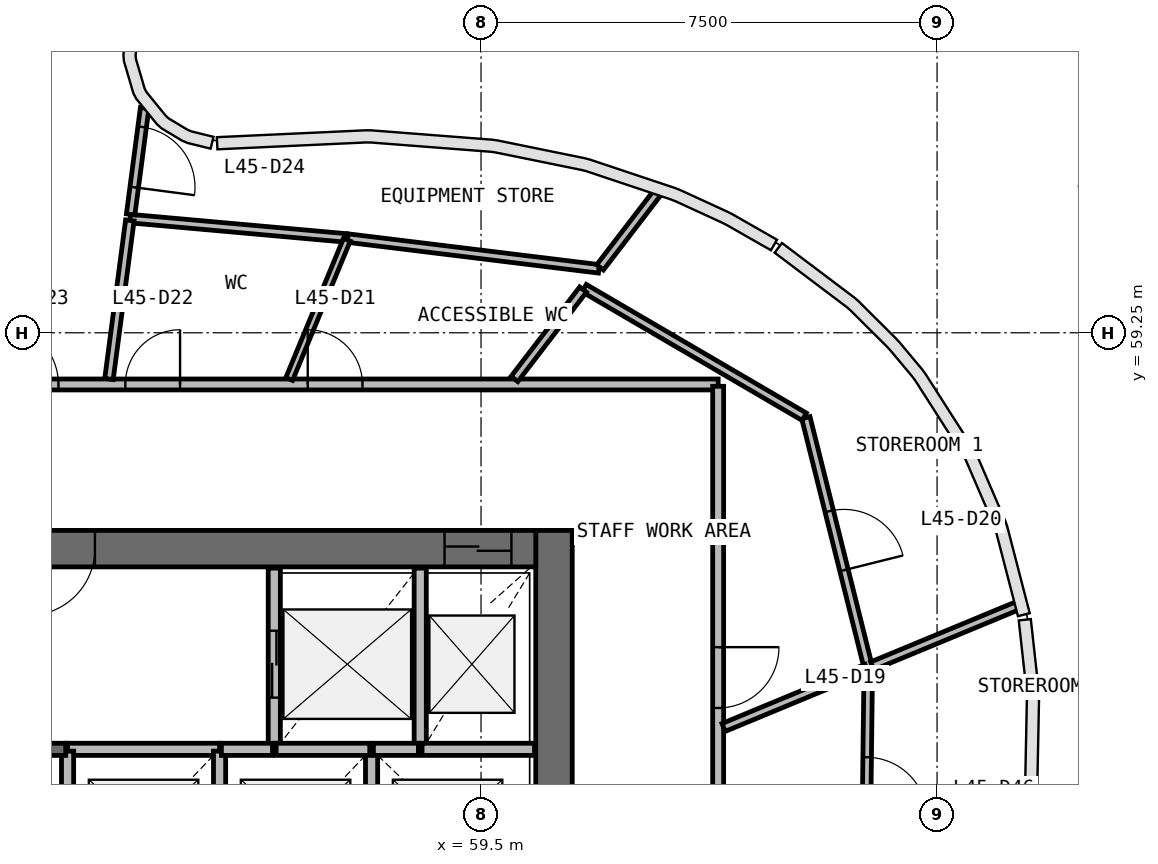
"""IFC4 building model, lengths in metres.
Left out: names, types, materials, properties, quantities, classifications, styles, units other than length and angle.
Written with IfcOpenShell. Run it as: python <this file> out.ifc"""

import sys

from ifc_helpers import new_model, si_unit, direction, frame, frame_2d, origin, place, context, subcontext, project, spatial, rectangle, extrude, source, transform, mapped, element, fill, save


model = new_model("IFC4")
c1 = context("Model", 3, precision=1e-05, world=origin(), true_north=direction((0.0, 1.0)))
c2 = subcontext(c1, "Body", "Model", "MODEL_VIEW")
j1 = project(units=[si_unit("LENGTHUNIT", "METRE"), si_unit("PLANEANGLEUNIT", "RADIAN")], contexts=[c1])
p1 = place(None, origin())
s1 = spatial("IfcSite", under=j1, at=p1, CompositionType="ELEMENT")
p2 = place(p1, origin())
s2 = spatial("IfcBuilding", under=s1, at=p2, CompositionType="ELEMENT")
p3 = place(p2, frame((0.0, 0.0, 187.7)))
s3 = spatial("IfcBuildingStorey", under=s2, at=p3, CompositionType="ELEMENT", Elevation=187.7)
p4 = place(p3, frame((60.7, 40.0, 0.0), z_axis=(0.0, 0.0, 1.0), x_axis=(0.0, 1.0, 0.0)))
e1 = element("IfcWall", 1, at=p4, inside=s3, PredefinedType="SHEAR", context=c2, shape_type="SweptSolid", body=[
    extrude(rectangle(XDim=16.0, YDim=0.6, at=frame_2d((8.0, 0.0))), origin(), (0.0, 0.0, 1.0), 3.9),
])
p5 = place(p4, frame((7.1, 0.0, 0.0)))
e2 = element("IfcOpeningElement", 2, at=p5, cuts=e1, PredefinedType="OPENING", context=c2, shape_type="SweptSolid", body=[
    extrude(rectangle(XDim=1.8, YDim=2.1, at=frame_2d((0.9, 1.05))), frame((0.0, 0.31, 0.0), z_axis=(0.0, -1.0, 0.0), x_axis=(1.0, 0.0, 0.0)), (0.0, 0.0, 1.0), 0.62),
])
p6 = place(p3, frame((60.4, 55.7, 0.0), z_axis=(0.0, 0.0, 1.0), x_axis=(-1.0, 0.0, 0.0)))
e3 = element("IfcWall", 3, at=p6, inside=s3, PredefinedType="SHEAR", context=c2, shape_type="SweptSolid", body=[
    extrude(rectangle(XDim=16.8, YDim=0.6, at=frame_2d((8.4, 0.0))), origin(), (0.0, 0.0, 1.0), 3.9),
])
p7 = place(p6, frame((0.4, 0.0, 0.0)))
e4 = element("IfcOpeningElement", 4, at=p7, cuts=e3, PredefinedType="OPENING", context=c2, shape_type="SweptSolid", body=[
    extrude(rectangle(XDim=1.1, YDim=2.1, at=frame_2d((0.55, 1.05))), frame((0.0, 0.31, 0.0), z_axis=(0.0, -1.0, 0.0), x_axis=(1.0, 0.0, 0.0)), (0.0, 0.0, 1.0), 0.62),
])
p8 = place(p6, frame((10.3, 0.0, 0.0)))
e5 = element("IfcOpeningElement", 5, at=p8, cuts=e3, PredefinedType="OPENING", context=c2, shape_type="SweptSolid", body=[
    extrude(rectangle(XDim=1.2, YDim=2.1, at=frame_2d((0.6, 1.05))), frame((0.0, 0.31, 0.0), z_axis=(0.0, -1.0, 0.0), x_axis=(1.0, 0.0, 0.0)), (0.0, 0.0, 1.0), 0.62),
])
p9 = place(p6, frame((7.25, 0.0, 0.0)))
e6 = element("IfcOpeningElement", 6, at=p9, cuts=e3, PredefinedType="OPENING", context=c2, shape_type="SweptSolid", body=[
    extrude(rectangle(XDim=1.1, YDim=2.1, at=frame_2d((0.55, 1.05))), frame((0.0, 0.31, 0.0), z_axis=(0.0, -1.0, 0.0), x_axis=(1.0, 0.0, 0.0)), (0.0, 0.0, 1.0), 0.62),
])
p10 = place(p3, frame((56.1, 55.38, 0.0), z_axis=(0.0, 0.0, 1.0), x_axis=(0.0, -1.0, 0.0)))
e7 = element("IfcWall", 7, at=p10, inside=s3, PredefinedType="SOLIDWALL", context=c2, shape_type="SweptSolid", body=[
    extrude(rectangle(XDim=2.98, YDim=0.2, at=frame_2d((1.49, 0.0))), origin(), (0.0, 0.0, 1.0), 3.58),
])
p11 = place(p10, frame((1.03, 0.0, 0.0)))
e8 = element("IfcOpeningElement", 8, at=p11, cuts=e7, PredefinedType="OPENING", context=c2, shape_type="SweptSolid", body=[
    extrude(rectangle(XDim=1.1, YDim=2.1, at=frame_2d((0.55, 1.05))), frame((0.0, 0.11, 0.0), z_axis=(0.0, -1.0, 0.0), x_axis=(1.0, 0.0, 0.0)), (0.0, 0.0, 1.0), 0.22),
])
p12 = place(p3, frame((58.5, 52.4, 0.0), z_axis=(0.0, 0.0, 1.0), x_axis=(0.0, 1.0, 0.0)))
e9 = element("IfcWall", 9, at=p12, inside=s3, PredefinedType="SOLIDWALL", context=c2, shape_type="SweptSolid", body=[
    extrude(rectangle(XDim=2.98, YDim=0.2, at=frame_2d((1.49, 0.0))), origin(), (0.0, 0.0, 1.0), 3.58),
])
p13 = place(p3, frame((55.2, 52.4, 0.0), z_axis=(0.0, 0.0, 1.0), x_axis=(-1.0, 0.0, 0.0)))
e10 = element("IfcWall", 10, at=p13, inside=s3, PredefinedType="SOLIDWALL", context=c2, shape_type="SweptSolid", body=[
    extrude(rectangle(XDim=2.5, YDim=0.2, at=frame_2d((1.25, 0.0))), origin(), (0.0, 0.0, 1.0), 3.58),
])
for number, where, z_axis, x_axis in (
    (11, (52.7, 52.37, 0.0), (0.0, 0.0, 1.0), (0.0, -1.0, 0.0)),
    (12, (55.2, 50.01, 0.0), (0.0, 0.0, 1.0), (0.0, 1.0, 0.0)),
):
    element("IfcWall", number, at=place(p3, frame(where, z_axis=z_axis, x_axis=x_axis)), inside=s3, PredefinedType="SOLIDWALL", context=c2, shape_type="SweptSolid", body=[
        extrude(rectangle(XDim=2.36, YDim=0.2, at=frame_2d((1.18, 0.0))), origin(), (0.0, 0.0, 1.0), 3.58),
    ])
p14 = place(p3, frame((57.7, 50.01, 0.0), z_axis=(0.0, 0.0, 1.0), x_axis=(0.0, 1.0, 0.0)))
e13 = element("IfcWall", 13, at=p14, inside=s3, PredefinedType="SOLIDWALL", context=c2, shape_type="SweptSolid", body=[
    extrude(rectangle(XDim=2.39, YDim=0.2, at=frame_2d((1.195, 0.0))), origin(), (0.0, 0.0, 1.0), 3.58),
])
p15 = place(p3, frame((50.43, 52.4, 0.0), z_axis=(0.0, 0.0, 1.0), x_axis=(1.0, 0.0, 0.0)))
e14 = element("IfcWall", 14, at=p15, inside=s3, PredefinedType="SOLIDWALL", context=c2, shape_type="SweptSolid", body=[
    extrude(rectangle(XDim=2.24, YDim=0.2, at=frame_2d((1.12, 0.0))), origin(), (0.0, 0.0, 1.0), 3.58),
])
p16 = place(p3, frame((60.38, 52.4, 0.0), z_axis=(0.0, 0.0, 1.0), x_axis=(-1.0, 0.0, 0.0)))
e15 = element("IfcWall", 15, at=p16, inside=s3, PredefinedType="SOLIDWALL", context=c2, shape_type="SweptSolid", body=[
    extrude(rectangle(XDim=1.85, YDim=0.2, at=frame_2d((0.925, 0.0))), origin(), (0.0, 0.0, 1.0), 3.58),
])
p17 = place(p3, frame((57.67, 52.4, 0.0), z_axis=(0.0, 0.0, 1.0), x_axis=(-1.0, 0.0, 0.0)))
e16 = element("IfcWall", 16, at=p17, inside=s3, PredefinedType="SOLIDWALL", context=c2, shape_type="SweptSolid", body=[
    extrude(rectangle(XDim=1.54, YDim=0.2, at=frame_2d((0.77, 0.0))), origin(), (0.0, 0.0, 1.0), 3.58),
])
p18 = place(p3, frame((56.07, 52.4, 0.0), z_axis=(0.0, 0.0, 1.0), x_axis=(-1.0, 0.0, 0.0)))
e17 = element("IfcWall", 17, at=p18, inside=s3, PredefinedType="SOLIDWALL", context=c2, shape_type="SweptSolid", body=[
    extrude(rectangle(XDim=0.84, YDim=0.2, at=frame_2d((0.42, 0.0))), origin(), (0.0, 0.0, 1.0), 3.58),
])
p19 = place(p3, frame((58.47, 52.4, 0.0), z_axis=(0.0, 0.0, 1.0), x_axis=(-1.0, 0.0, 0.0)))
e18 = element("IfcWall", 18, at=p19, inside=s3, PredefinedType="SOLIDWALL", context=c2, shape_type="SweptSolid", body=[
    extrude(rectangle(XDim=0.74, YDim=0.2, at=frame_2d((0.37, 0.0))), origin(), (0.0, 0.0, 1.0), 3.58),
])
p20 = place(p3, frame((40.6, 58.4, 0.0), z_axis=(0.0, 0.0, 1.0), x_axis=(1.0, 0.0, 0.0)))
e19 = element("IfcWall", 19, at=p20, inside=s3, PredefinedType="PARTITIONING", context=c2, shape_type="SweptSolid", body=[
    extrude(rectangle(XDim=22.8, YDim=0.18, at=frame_2d((11.4, 0.0))), origin(), (0.0, 0.0, 1.0), 2.88),
])
p21 = place(p20, frame((16.05, 0.0, 0.0)))
e20 = element("IfcOpeningElement", 20, at=p21, cuts=e19, PredefinedType="OPENING", context=c2, shape_type="SweptSolid", body=[
    extrude(rectangle(XDim=0.9, YDim=2.1, at=frame_2d((0.45, 1.05))), frame((0.0, 0.1, 0.0), z_axis=(0.0, -1.0, 0.0), x_axis=(1.0, 0.0, 0.0)), (0.0, 0.0, 1.0), 0.2),
])
p22 = place(p20, frame((13.05, 0.0, 0.0)))
e21 = element("IfcOpeningElement", 21, at=p22, cuts=e19, PredefinedType="OPENING", context=c2, shape_type="SweptSolid", body=[
    extrude(rectangle(XDim=0.9, YDim=2.1, at=frame_2d((0.45, 1.05))), frame((0.0, 0.1, 0.0), z_axis=(0.0, -1.0, 0.0), x_axis=(1.0, 0.0, 0.0)), (0.0, 0.0, 1.0), 0.2),
])
p23 = place(p20, frame((10.95, 0.0, 0.0)))
e22 = element("IfcOpeningElement", 22, at=p23, cuts=e19, PredefinedType="OPENING", context=c2, shape_type="SweptSolid", body=[
    extrude(rectangle(XDim=1.0, YDim=2.1, at=frame_2d((0.5, 1.05))), frame((0.0, 0.1, 0.0), z_axis=(0.0, -1.0, 0.0), x_axis=(1.0, 0.0, 0.0)), (0.0, 0.0, 1.0), 0.2),
])
p24 = place(p3, frame((63.4, 58.37, 0.0), z_axis=(0.0, 0.0, 1.0), x_axis=(0.0, -1.0, 0.0)))
e23 = element("IfcWall", 23, at=p24, inside=s3, PredefinedType="PARTITIONING", context=c2, shape_type="SweptSolid", body=[
    extrude(rectangle(XDim=20.74, YDim=0.18, at=frame_2d((10.37, 0.0))), origin(), (0.0, 0.0, 1.0), 2.88),
])
p25 = place(p24, frame((4.29, 0.0, 0.0)))
e24 = element("IfcOpeningElement", 24, at=p25, cuts=e23, PredefinedType="OPENING", context=c2, shape_type="SweptSolid", body=[
    extrude(rectangle(XDim=1.0, YDim=2.1, at=frame_2d((0.5, 1.05))), frame((0.0, 0.1, 0.0), z_axis=(0.0, -1.0, 0.0), x_axis=(1.0, 0.0, 0.0)), (0.0, 0.0, 1.0), 0.2),
])
p26 = place(p24, frame((12.09, 0.0, 0.0)))
e25 = element("IfcOpeningElement", 25, at=p26, cuts=e23, PredefinedType="OPENING", context=c2, shape_type="SweptSolid", body=[
    extrude(rectangle(XDim=1.0, YDim=2.1, at=frame_2d((0.5, 1.05))), frame((0.0, 0.1, 0.0), z_axis=(0.0, -1.0, 0.0), x_axis=(1.0, 0.0, 0.0)), (0.0, 0.0, 1.0), 0.2),
])
p27 = place(p24, frame((9.89, 0.0, 0.0)))
e26 = element("IfcOpeningElement", 26, at=p27, cuts=e23, PredefinedType="OPENING", context=c2, shape_type="SweptSolid", body=[
    extrude(rectangle(XDim=1.0, YDim=2.1, at=frame_2d((0.5, 1.05))), frame((0.0, 0.1, 0.0), z_axis=(0.0, -1.0, 0.0), x_axis=(1.0, 0.0, 0.0)), (0.0, 0.0, 1.0), 0.2),
])
p28 = place(p3, frame((64.842, 57.854, 0.0), z_axis=(0.0, 0.0, 1.0), x_axis=(0.2424271277, -0.970169618033, 0.0)))
e27 = element("IfcWall", 27, at=p28, inside=s3, PredefinedType="PARTITIONING", context=c2, shape_type="SweptSolid", body=[
    extrude(rectangle(XDim=4.236, YDim=0.14, at=frame_2d((2.118, 0.0))), origin(), (0.0, 0.0, 1.0), 2.88),
])
p29 = place(p28, frame((1.586, 0.0, 0.0)))
e28 = element("IfcOpeningElement", 28, at=p29, cuts=e27, PredefinedType="OPENING", context=c2, shape_type="SweptSolid", body=[
    extrude(rectangle(XDim=1.0, YDim=2.1, at=frame_2d((0.5, 1.05))), frame((0.0, 0.08, 0.0), z_axis=(0.0, -1.0, 0.0), x_axis=(1.0, 0.0, 0.0)), (0.0, 0.0, 1.0), 0.16),
])
p30 = place(p3, frame((64.816, 57.869, 0.0), z_axis=(0.0, 0.0, 1.0), x_axis=(-0.86339006173, 0.504537016785, 0.0)))
e29 = element("IfcWall", 29, at=p30, inside=s3, PredefinedType="PARTITIONING", context=c2, shape_type="SweptSolid", body=[
    extrude(rectangle(XDim=4.193, YDim=0.14, at=frame_2d((2.096, 0.0))), origin(), (0.0, 0.0, 1.0), 2.88),
])
p31 = place(p3, frame((61.439, 60.302, 0.0), z_axis=(0.0, 0.0, 1.0), x_axis=(-0.99258234717, 0.121574191698, 0.0)))
e30 = element("IfcWall", 30, at=p31, inside=s3, PredefinedType="PARTITIONING", context=c2, shape_type="SweptSolid", body=[
    extrude(rectangle(XDim=4.165, YDim=0.14, at=frame_2d((2.083, 0.0))), origin(), (0.0, 0.0, 1.0), 2.88),
])
p32 = place(p3, frame((65.868, 53.715, 0.0), z_axis=(0.0, 0.0, 1.0), x_axis=(-0.01234705924, -0.999923772159, 0.0)))
e31 = element("IfcWall", 31, at=p32, inside=s3, PredefinedType="PARTITIONING", context=c2, shape_type="SweptSolid", body=[
    extrude(rectangle(XDim=3.895, YDim=0.14, at=frame_2d((1.948, 0.0))), origin(), (0.0, 0.0, 1.0), 2.88),
])
p33 = place(p32, frame((1.446, 0.0, 0.0)))
e32 = element("IfcOpeningElement", 32, at=p33, cuts=e31, PredefinedType="OPENING", context=c2, shape_type="SweptSolid", body=[
    extrude(rectangle(XDim=1.0, YDim=2.1, at=frame_2d((0.5, 1.05))), frame((0.0, 0.08, 0.0), z_axis=(0.0, -1.0, 0.0), x_axis=(1.0, 0.0, 0.0)), (0.0, 0.0, 1.0), 0.16),
])
p34 = place(p3, frame((57.275, 60.811, 0.0), z_axis=(0.0, 0.0, 1.0), x_axis=(-0.996026962711, 0.08905217321, 0.0)))
e33 = element("IfcWall", 33, at=p34, inside=s3, PredefinedType="PARTITIONING", context=c2, shape_type="SweptSolid", body=[
    extrude(rectangle(XDim=3.561, YDim=0.14, at=frame_2d((1.781, 0.0))), origin(), (0.0, 0.0, 1.0), 2.88),
])
p35 = place(p3, frame((53.381, 58.49, 0.0), z_axis=(0.0, 0.0, 1.0), x_axis=(0.130497729181, 0.991448608188, 0.0)))
e34 = element("IfcWall", 34, at=p35, inside=s3, PredefinedType="PARTITIONING", context=c2, shape_type="SweptSolid", body=[
    extrude(rectangle(XDim=2.63, YDim=0.14, at=frame_2d((1.315, 0.0))), origin(), (0.0, 0.0, 1.0), 2.88),
])
p36 = place(p3, frame((65.934, 53.772, 0.0), z_axis=(0.0, 0.0, 1.0), x_axis=(0.923877293678, 0.382688837341, 0.0)))
e35 = element("IfcWall", 35, at=p36, inside=s3, PredefinedType="PARTITIONING", context=c2, shape_type="SweptSolid", body=[
    extrude(rectangle(XDim=2.602, YDim=0.14, at=frame_2d((1.301, 0.0))), origin(), (0.0, 0.0, 1.0), 2.88),
])
p37 = place(p3, frame((63.49, 52.759, 0.0), z_axis=(0.0, 0.0, 1.0), x_axis=(0.923889395606, 0.382659619881, 0.0)))
e36 = element("IfcWall", 36, at=p37, inside=s3, PredefinedType="PARTITIONING", context=c2, shape_type="SweptSolid", body=[
    extrude(rectangle(XDim=2.545, YDim=0.14, at=frame_2d((1.272, 0.0))), origin(), (0.0, 0.0, 1.0), 2.88),
])
p38 = place(p3, frame((60.049, 58.49, 0.0), z_axis=(0.0, 0.0, 1.0), x_axis=(0.60873011284, 0.79337736905, 0.0)))
e37 = element("IfcWall", 37, at=p38, inside=s3, PredefinedType="PARTITIONING", context=c2, shape_type="SweptSolid", body=[
    extrude(rectangle(XDim=1.854, YDim=0.14, at=frame_2d((0.927, 0.0))), origin(), (0.0, 0.0, 1.0), 2.88),
])
p39 = place(p3, frame((53.968, 62.946, 0.0), z_axis=(0.0, 0.0, 1.0), x_axis=(-0.130658590835, -0.991427421772, 0.0)))
e38 = element("IfcWall", 38, at=p39, inside=s3, PredefinedType="PARTITIONING", context=c2, shape_type="SweptSolid", body=[
    extrude(rectangle(XDim=1.764, YDim=0.14, at=frame_2d((0.882, 0.0))), origin(), (0.0, 0.0, 1.0), 2.88),
])
p40 = place(p39, frame((0.314, 0.0, 0.0)))
e39 = element("IfcOpeningElement", 39, at=p40, cuts=e38, PredefinedType="OPENING", context=c2, shape_type="SweptSolid", body=[
    extrude(rectangle(XDim=1.0, YDim=2.1, at=frame_2d((0.5, 1.05))), frame((0.0, 0.08, 0.0), z_axis=(0.0, -1.0, 0.0), x_axis=(1.0, 0.0, 0.0)), (0.0, 0.0, 1.0), 0.16),
])
p41 = place(p3, frame((61.458, 60.325, 0.0), z_axis=(0.0, 0.0, 1.0), x_axis=(0.608709383153, 0.793393273769, 0.0)))
e40 = element("IfcWall", 40, at=p41, inside=s3, PredefinedType="PARTITIONING", context=c2, shape_type="SweptSolid", body=[
    extrude(rectangle(XDim=1.568, YDim=0.14, at=frame_2d((0.784, 0.0))), origin(), (0.0, 0.0, 1.0), 2.88),
])
p42 = place(p3, frame((56.345, 58.49, 0.0), z_axis=(0.0, 0.0, 1.0), x_axis=(0.382656259044, 0.923890787601, 0.0)))
e41 = element("IfcWall", 41, at=p42, inside=s3, PredefinedType="PARTITIONING", context=c2, shape_type="SweptSolid", body=[
    extrude(rectangle(XDim=2.479, YDim=0.12, at=frame_2d((1.239, 0.0))), origin(), (0.0, 0.0, 1.0), 2.88),
])
m1 = source(origin(), c2, "Body", "SweptSolid", [
    extrude(rectangle(XDim=1.1, YDim=2.1, at=frame_2d((0.55, 1.05))), frame((0.0, 0.025, 0.0), z_axis=(0.0, -1.0, 0.0), x_axis=(1.0, 0.0, 0.0)), (0.0, 0.0, 1.0), 0.05),
])
p43 = place(p11, origin())
e42 = element("IfcDoor", 42, at=p43, inside=s3, OperationType="DOUBLE_DOOR_SLIDING", PredefinedType="USERDEFINED", context=c2, shape_type="MappedRepresentation", body=[
    mapped(m1, transform((0.0, 0.0, 0.0), scale=1.0)),
])
fill(e8, e42)
p44 = place(p7, origin())
e43 = element("IfcDoor", 43, at=p44, inside=s3, OperationType="DOUBLE_DOOR_SLIDING", PredefinedType="USERDEFINED", context=c2, shape_type="MappedRepresentation", body=[
    mapped(m1, transform((0.0, 0.0, 0.0), scale=1.0)),
])
fill(e4, e43)
m2 = source(origin(), c2, "Body", "SweptSolid", [
    extrude(rectangle(XDim=1.1, YDim=2.1, at=frame_2d((0.55, 1.05))), frame((0.0, 0.025, 0.0), z_axis=(0.0, -1.0, 0.0), x_axis=(1.0, 0.0, 0.0)), (0.0, 0.0, 1.0), 0.05),
])
p45 = place(p9, origin())
e44 = element("IfcDoor", 44, at=p45, inside=s3, OperationType="SINGLE_SWING_RIGHT", PredefinedType="DOOR", context=c2, shape_type="MappedRepresentation", body=[
    mapped(m2, transform((0.0, 0.0, 0.0), scale=1.0)),
])
fill(e6, e44)
m3 = source(origin(), c2, "Body", "SweptSolid", [
    extrude(rectangle(XDim=1.0, YDim=2.1, at=frame_2d((0.5, 1.05))), frame((0.0, 0.025, 0.0), z_axis=(0.0, -1.0, 0.0), x_axis=(1.0, 0.0, 0.0)), (0.0, 0.0, 1.0), 0.05),
])
p46 = place(p25, origin())
e45 = element("IfcDoor", 45, at=p46, inside=s3, OperationType="SINGLE_SWING_LEFT", PredefinedType="DOOR", context=c2, shape_type="MappedRepresentation", body=[
    mapped(m3, transform((0.0, 0.0, 0.0), scale=1.0)),
])
fill(e24, e45)
p47 = place(p29, origin())
e46 = element("IfcDoor", 46, at=p47, inside=s3, OperationType="SINGLE_SWING_RIGHT", PredefinedType="DOOR", context=c2, shape_type="MappedRepresentation", body=[
    mapped(m3, transform((0.0, 0.0, 0.0), scale=1.0)),
])
fill(e28, e46)
m4 = source(origin(), c2, "Body", "SweptSolid", [
    extrude(rectangle(XDim=0.9, YDim=2.1, at=frame_2d((0.45, 1.05))), frame((0.0, 0.025, 0.0), z_axis=(0.0, -1.0, 0.0), x_axis=(1.0, 0.0, 0.0)), (0.0, 0.0, 1.0), 0.05),
])
p48 = place(p21, origin())
e47 = element("IfcDoor", 47, at=p48, inside=s3, OperationType="SINGLE_SWING_LEFT", PredefinedType="DOOR", context=c2, shape_type="MappedRepresentation", body=[
    mapped(m4, transform((0.0, 0.0, 0.0), scale=1.0)),
])
fill(e20, e47)
p49 = place(p22, origin())
e48 = element("IfcDoor", 48, at=p49, inside=s3, OperationType="SINGLE_SWING_RIGHT", PredefinedType="DOOR", context=c2, shape_type="MappedRepresentation", body=[
    mapped(m4, transform((0.0, 0.0, 0.0), scale=1.0)),
])
fill(e21, e48)
p50 = place(p23, origin())
e49 = element("IfcDoor", 49, at=p50, inside=s3, OperationType="SINGLE_SWING_LEFT", PredefinedType="DOOR", context=c2, shape_type="MappedRepresentation", body=[
    mapped(m3, transform((0.0, 0.0, 0.0), scale=1.0)),
])
fill(e22, e49)
p51 = place(p40, origin())
e50 = element("IfcDoor", 50, at=p51, inside=s3, OperationType="SINGLE_SWING_RIGHT", PredefinedType="DOOR", context=c2, shape_type="MappedRepresentation", body=[
    mapped(m3, transform((0.0, 0.0, 0.0), scale=1.0)),
])
fill(e39, e50)
p52 = place(p33, origin())
e51 = element("IfcDoor", 51, at=p52, inside=s3, OperationType="SINGLE_SWING_RIGHT", PredefinedType="DOOR", context=c2, shape_type="MappedRepresentation", body=[
    mapped(m3, transform((0.0, 0.0, 0.0), scale=1.0)),
])
fill(e32, e51)
save(model, sys.argv[1])
